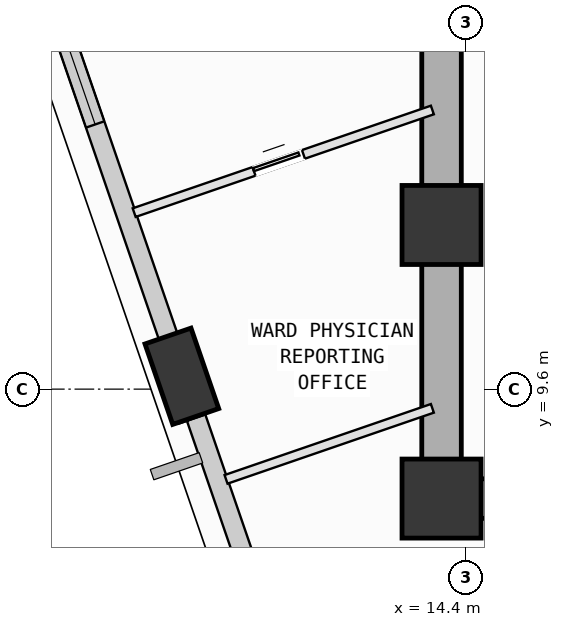
"""IFC4 building model, lengths in metres.
Left out: names, types, materials, properties, quantities, classifications, styles, units other than length and angle.
Written with IfcOpenShell. Run it as: python <this file> out.ifc"""

import sys

from ifc_helpers import new_model, si_unit, direction, frame, frame_2d, origin, origin_2d, place, context, subcontext, project, spatial, rectangle, extrude, element, fill, save


model = new_model("IFC4")
c1 = context("Model", 3, precision=1e-05, world=origin(), true_north=direction((0.0, 1.0)))
c2 = subcontext(c1, "Body", "Model", "MODEL_VIEW")
j1 = project(units=[si_unit("LENGTHUNIT", "METRE"), si_unit("PLANEANGLEUNIT", "RADIAN")], contexts=[c1])
p1 = place(None, origin())
s1 = spatial("IfcSite", under=j1, at=p1, CompositionType="ELEMENT")
p2 = place(p1, origin())
s2 = spatial("IfcBuilding", under=s1, at=p2, CompositionType="ELEMENT")
p3 = place(p2, frame((0.0, 0.0, 104.4)))
s3 = spatial("IfcBuildingStorey", under=s2, at=p3, CompositionType="ELEMENT", Elevation=104.4)
for number, where, z_axis, x_axis in (
    (1, (14.0, 7.8, 0.0), (0.0, 0.0, 1.0), (1.0, 0.0, 0.0)),
    (2, (14.0, 12.3, 0.0), (0.0, 0.0, 1.0), (1.0, 0.0, 0.0)),
):
    element("IfcColumn", number, at=place(p3, frame(where, z_axis=z_axis, x_axis=x_axis)), inside=s3, PredefinedType="COLUMN", context=c2, shape_type="SweptSolid", body=[
        extrude(rectangle(XDim=1.3, YDim=1.3, at=origin_2d()), origin(), (0.0, 0.0, 1.0), 4.0),
    ])
p4 = place(p3, frame((9.729, 9.812, 0.002), z_axis=(0.062498480649, -0.097813156122, 0.993240417223), x_axis=(-0.780001270901, 0.616078452435, 0.109751345492)))
e3 = element("IfcColumn", 3, at=p4, inside=s3, PredefinedType="COLUMN", context=c2, shape_type="SweptSolid", body=[
    extrude(rectangle(XDim=1.4, YDim=0.8, at=origin_2d()), origin(), (0.0, 0.0, 1.0), 4.023),
])
p5 = place(p3, frame((9.643, 10.063, 0.0), z_axis=(0.0, 0.0, 1.0), x_axis=(-0.325566416209, 0.945519174124, 0.0)))
e4 = element("IfcWall", 4, at=p5, inside=s3, PredefinedType="SOLIDWALL", context=c2, shape_type="SweptSolid", body=[
    extrude(rectangle(XDim=7.36, YDim=0.32, at=frame_2d((3.68, 0.0))), origin(), (0.0, 0.0, 1.0), 3.165),
])
p6 = place(p5, frame((4.114, 0.0, 0.75)))
e5 = element("IfcOpeningElement", 5, at=p6, cuts=e4, PredefinedType="OPENING", context=c2, shape_type="SweptSolid", body=[
    extrude(rectangle(XDim=1.8, YDim=2.05, at=frame_2d((0.9, 1.025))), frame((0.0, 0.17, 0.0), z_axis=(0.0, -1.0, 0.0), x_axis=(1.0, 0.0, 0.0)), (0.0, 0.0, 1.0), 0.34),
])
p7 = place(p3, frame((11.99, 3.246, 0.0), z_axis=(0.0, 0.0, 1.0), x_axis=(-0.325556635095, 0.945522541955, 0.0)))
e6 = element("IfcWall", 6, at=p7, inside=s3, PredefinedType="SOLIDWALL", context=c2, shape_type="SweptSolid", body=[
    extrude(rectangle(XDim=6.224, YDim=0.32, at=frame_2d((3.112, 0.0))), origin(), (0.0, 0.0, 1.0), 3.165),
])
p8 = place(p7, frame((1.85, 0.0, 0.75)))
e7 = element("IfcOpeningElement", 7, at=p8, cuts=e6, PredefinedType="OPENING", context=c2, shape_type="SweptSolid", body=[
    extrude(rectangle(XDim=1.2, YDim=1.75, at=frame_2d((0.6, 0.875))), frame((0.0, 0.17, 0.0), z_axis=(0.0, -1.0, 0.0), x_axis=(1.0, 0.0, 0.0)), (0.0, 0.0, 1.0), 0.34),
])
p9 = place(p3, frame((14.0, 7.8, 0.0), z_axis=(0.0, 0.0, 1.0), x_axis=(1.0, 0.0, 0.0)))
e8 = element("IfcWall", 8, at=p9, inside=s3, PredefinedType="SHEAR", context=c2, shape_type="SweptSolid", body=[
    extrude(rectangle(XDim=10.8, YDim=0.65, at=frame_2d((5.4, 0.0))), origin(), (0.0, 0.0, 1.0), 3.78),
])
p10 = place(p3, frame((14.0, 16.8, 0.0), z_axis=(0.0, 0.0, 1.0), x_axis=(0.0, -1.0, 0.0)))
e9 = element("IfcWall", 9, at=p10, inside=s3, PredefinedType="SHEAR", context=c2, shape_type="SweptSolid", body=[
    extrude(rectangle(XDim=9.0, YDim=0.65, at=frame_2d((4.5, 0.0))), origin(), (0.0, 0.0, 1.0), 3.78),
])
p11 = place(p3, frame((9.746, 9.056, 0.0), z_axis=(0.0, 0.0, 1.0), x_axis=(-0.325342506217, 0.945596242404, 0.0)))
e10 = element("IfcWall", 10, at=p11, inside=s3, PredefinedType="PARTITIONING", context=c2, shape_type="SweptSolid", body=[
    extrude(rectangle(XDim=0.987, YDim=0.15, at=frame_2d((0.493, 0.0))), origin(), (0.0, 0.0, 1.0), 3.165),
])
p12 = place(p3, frame((8.945, 12.503, 0.0), z_axis=(0.0, 0.0, 1.0), x_axis=(0.945554923034, 0.325462574693, 0.0)))
e11 = element("IfcWall", 11, at=p12, inside=s3, PredefinedType="PARTITIONING", context=c2, shape_type="SweptSolid", body=[
    extrude(rectangle(XDim=5.187, YDim=0.15, at=frame_2d((2.593, 0.0))), origin(), (0.0, 0.0, 1.0), 3.78),
])
p13 = place(p12, frame((2.084, 0.0, 0.0)))
e12 = element("IfcOpeningElement", 12, at=p13, cuts=e11, PredefinedType="OPENING", context=c2, shape_type="SweptSolid", body=[
    extrude(rectangle(XDim=0.86, YDim=2.06, at=frame_2d((0.43, 1.03))), frame((0.0, 0.085, 0.0), z_axis=(0.0, -1.0, 0.0), x_axis=(1.0, 0.0, 0.0)), (0.0, 0.0, 1.0), 0.17),
])
p14 = place(p3, frame((13.849, 9.284, 0.0), z_axis=(0.0, 0.0, 1.0), x_axis=(-0.945549256794, -0.325479036156, 0.0)))
e13 = element("IfcWall", 13, at=p14, inside=s3, PredefinedType="PARTITIONING", context=c2, shape_type="SweptSolid", body=[
    extrude(rectangle(XDim=3.588, YDim=0.15, at=frame_2d((1.794, 0.0))), origin(), (0.0, 0.0, 1.0), 3.78),
])
p15 = place(p6, origin())
e14 = element("IfcWindow", 14, at=p15, inside=s3, PartitioningType="SINGLE_PANEL", PredefinedType="WINDOW", context=c2, shape_type="SweptSolid", body=[
    extrude(rectangle(XDim=1.8, YDim=2.05, at=frame_2d((0.9, 1.025))), frame((0.0, 0.03, 0.0), z_axis=(0.0, -1.0, 0.0), x_axis=(1.0, 0.0, 0.0)), (0.0, 0.0, 1.0), 0.06),
])
fill(e5, e14)
p16 = place(p13, origin())
e15 = element("IfcDoor", 15, at=p16, inside=s3, OperationType="SLIDING_TO_LEFT", PredefinedType="DOOR", context=c2, shape_type="SweptSolid", body=[
    extrude(rectangle(XDim=0.86, YDim=2.06, at=frame_2d((0.43, 1.03))), frame((0.0, 0.025, 0.0), z_axis=(0.0, -1.0, 0.0), x_axis=(1.0, 0.0, 0.0)), (0.0, 0.0, 1.0), 0.05),
])
fill(e12, e15)
save(model, sys.argv[1])
